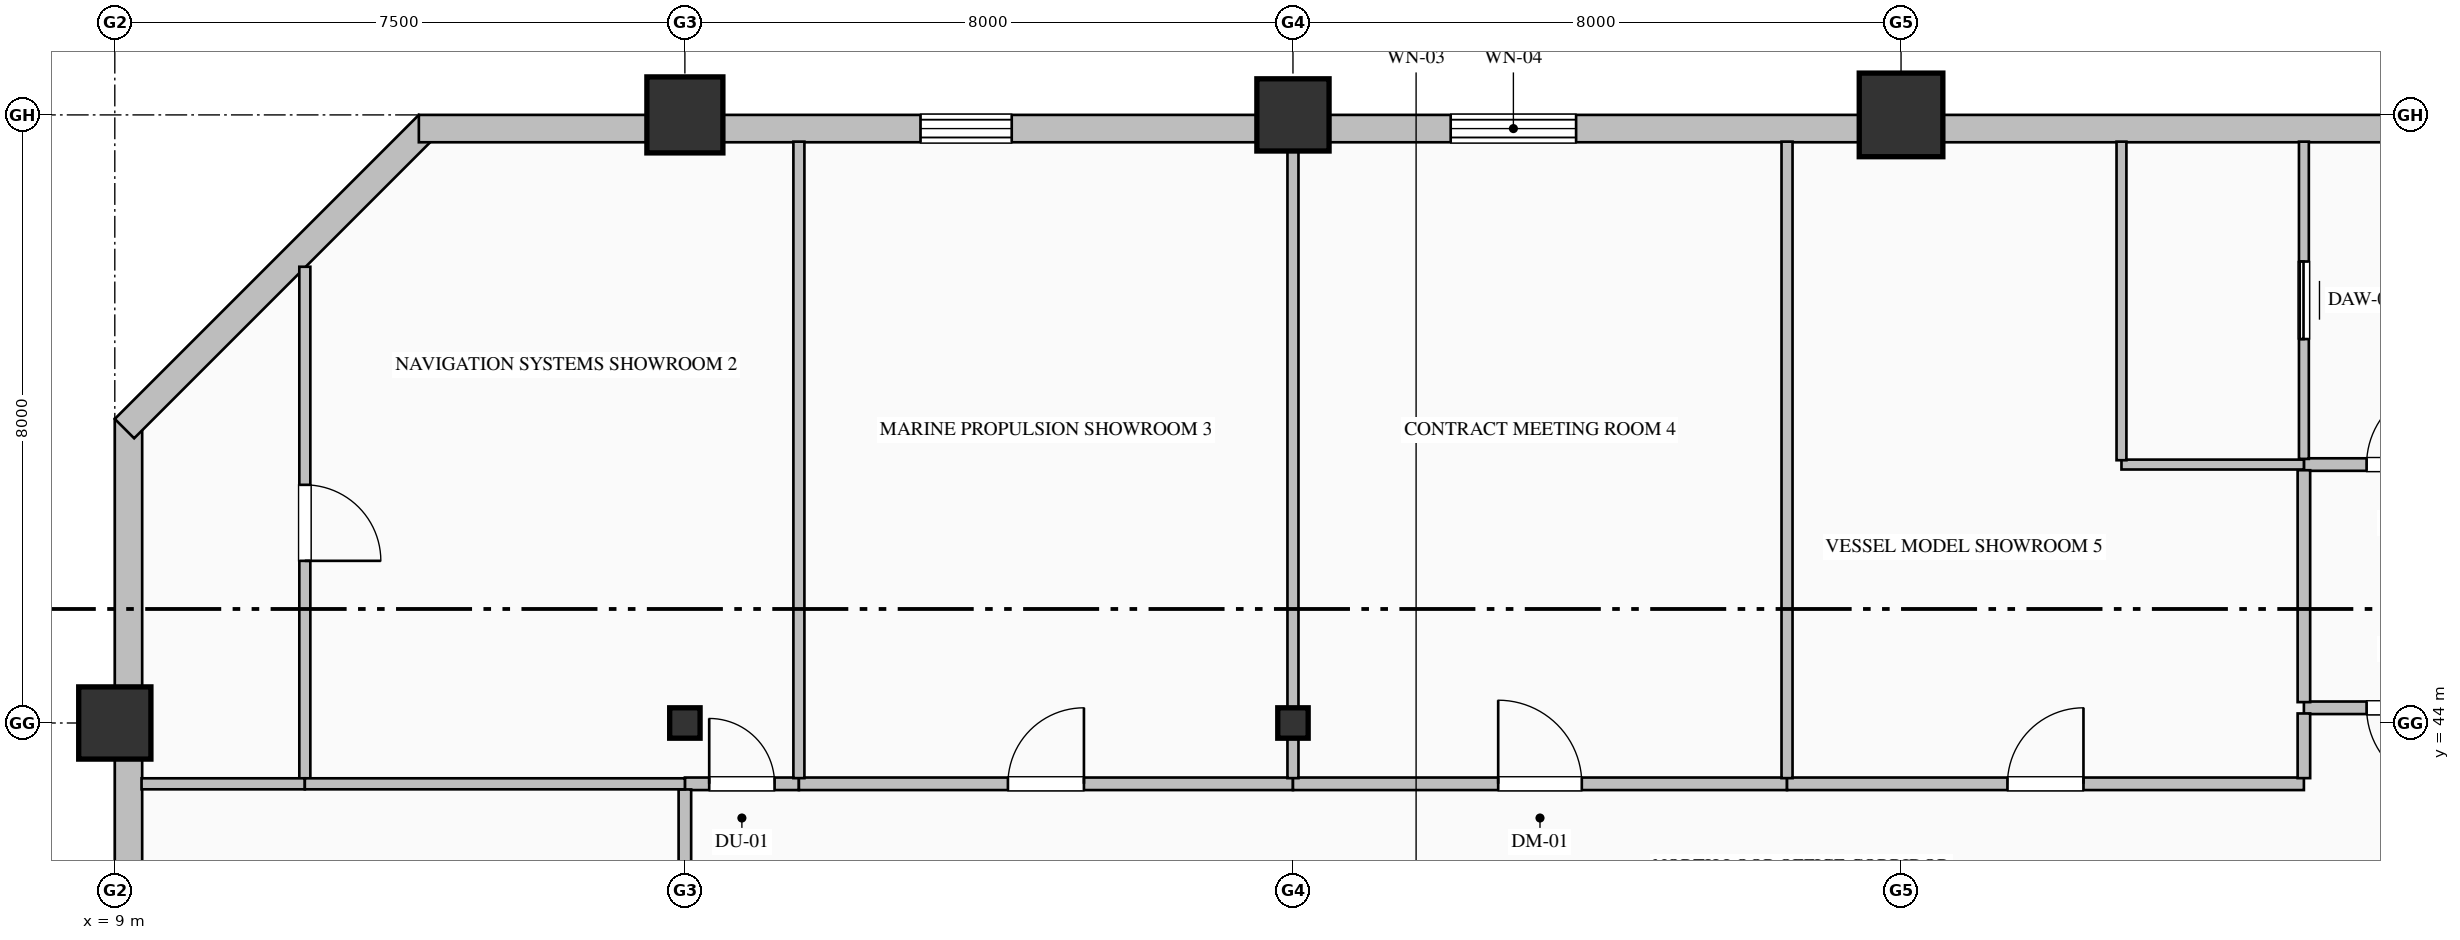
"""IFC4 building model, lengths in metres.
Left out: names, types, materials, properties, quantities, classifications, styles, units other than length and angle.
Written with IfcOpenShell. Run it as: python <this file> out.ifc"""

import sys

from ifc_helpers import new_model, si_unit, direction, frame, frame_2d, origin, origin_2d, place, context, subcontext, project, spatial, rectangle, hollow_rectangle, hollow_circle, i_section, extrude, element, fill, save


model = new_model("IFC4")
c1 = context("Model", 3, precision=1e-05, world=origin(), true_north=direction((0.0, 1.0)))
c2 = subcontext(c1, "Body", "Model", "MODEL_VIEW")
j1 = project(units=[si_unit("LENGTHUNIT", "METRE"), si_unit("PLANEANGLEUNIT", "RADIAN")], contexts=[c1])
p1 = place(None, origin())
s1 = spatial("IfcSite", under=j1, at=p1, CompositionType="ELEMENT")
p2 = place(p1, origin())
s2 = spatial("IfcBuilding", under=s1, at=p2, CompositionType="ELEMENT")
p3 = place(p2, frame((0.0, 0.0, 183.0)))
s3 = spatial("IfcBuildingStorey", under=s2, at=p3, CompositionType="ELEMENT", Elevation=183.0)
p4 = place(p3, frame((9.0, 44.0, 0.0), z_axis=(0.0, 0.0, 1.0), x_axis=(1.0, 0.0, 0.0)))
e1 = element("IfcColumn", 1, at=p4, inside=s3, PredefinedType="COLUMN", context=c2, shape_type="SweptSolid", body=[
    extrude(hollow_rectangle(XDim=0.95, YDim=0.95, WallThickness=0.036, at=origin_2d()), origin(), (0.0, 0.0, 1.0), 4.0),
])
p5 = place(p3, frame((16.5, 44.0, 0.0), z_axis=(0.0, 0.0, 1.0), x_axis=(1.0, 0.0, 0.0)))
e2 = element("IfcColumn", 2, at=p5, inside=s3, PredefinedType="COLUMN", context=c2, shape_type="SweptSolid", body=[
    extrude(i_section(OverallWidth=0.4, OverallDepth=0.4, WebThickness=0.013, FlangeThickness=0.021, FilletRadius=0.022, at=origin_2d()), origin(), (0.0, 0.0, 1.0), 4.0),
])
p6 = place(p3, frame((16.5, 52.0, 0.0), z_axis=(0.0, 0.0, 1.0), x_axis=(1.0, 0.0, 0.0)))
e3 = element("IfcColumn", 3, at=p6, inside=s3, PredefinedType="COLUMN", context=c2, shape_type="SweptSolid", body=[
    extrude(hollow_circle(Radius=0.5, WallThickness=0.036, at=origin_2d()), origin(), (0.0, 0.0, 1.0), 4.0),
])
p7 = place(p3, frame((24.5, 44.0, 0.0), z_axis=(0.0, 0.0, 1.0), x_axis=(1.0, 0.0, 0.0)))
e4 = element("IfcColumn", 4, at=p7, inside=s3, PredefinedType="COLUMN", context=c2, shape_type="SweptSolid", body=[
    extrude(i_section(OverallWidth=0.4, OverallDepth=0.4, WebThickness=0.013, FlangeThickness=0.021, FilletRadius=0.022, at=origin_2d()), origin(), (0.0, 0.0, 1.0), 4.0),
])
p8 = place(p3, frame((24.5, 52.0, 0.0), z_axis=(0.0, 0.0, 1.0), x_axis=(1.0, 0.0, 0.0)))
e5 = element("IfcColumn", 5, at=p8, inside=s3, PredefinedType="COLUMN", context=c2, shape_type="SweptSolid", body=[
    extrude(hollow_rectangle(XDim=0.95, YDim=0.95, WallThickness=0.036, at=origin_2d()), origin(), (0.0, 0.0, 1.0), 4.0),
])
p9 = place(p3, frame((32.5, 52.0, 0.0), z_axis=(0.0, 0.0, 1.0), x_axis=(1.0, 0.0, 0.0)))
e6 = element("IfcColumn", 6, at=p9, inside=s3, PredefinedType="COLUMN", context=c2, shape_type="SweptSolid", body=[
    extrude(hollow_rectangle(XDim=1.1, YDim=1.1, WallThickness=0.04, at=origin_2d()), origin(), (0.0, 0.0, 1.0), 4.0),
])
p10 = place(p3, frame((9.18, 32.0, 0.0), z_axis=(0.0, 0.0, 1.0), x_axis=(0.0, 1.0, 0.0)))
e7 = element("IfcWall", 7, at=p10, inside=s3, PredefinedType="SOLIDWALL", context=c2, shape_type="SweptSolid", body=[
    extrude(rectangle(XDim=16.0, YDim=0.36, at=frame_2d((8.0, 0.0))), origin(), (0.0, 0.0, 1.0), 3.265),
])
p11 = place(p10, frame((6.45, 0.0, 0.85)))
e8 = element("IfcOpeningElement", 8, at=p11, cuts=e7, PredefinedType="OPENING", context=c2, shape_type="SweptSolid", body=[
    extrude(rectangle(XDim=1.5, YDim=1.95, at=frame_2d((0.75, 0.975))), frame((0.0, 0.19, 0.0), z_axis=(0.0, -1.0, 0.0), x_axis=(1.0, 0.0, 0.0)), (0.0, 0.0, 1.0), 0.38),
])
p12 = place(p3, frame((9.127, 47.873, 0.0), z_axis=(0.0, 0.0, 1.0), x_axis=(0.707106781187, 0.707106781187, 0.0)))
e9 = element("IfcWall", 9, at=p12, inside=s3, PredefinedType="SOLIDWALL", context=c2, shape_type="SweptSolid", body=[
    extrude(rectangle(XDim=5.657, YDim=0.36, at=frame_2d((2.828, 0.0))), origin(), (0.0, 0.0, 1.0), 3.765),
])
p13 = place(p3, frame((13.0, 51.82, 0.0), z_axis=(0.0, 0.0, 1.0), x_axis=(1.0, 0.0, 0.0)))
e10 = element("IfcWall", 10, at=p13, inside=s3, PredefinedType="SOLIDWALL", context=c2, shape_type="SweptSolid", body=[
    extrude(rectangle(XDim=27.52, YDim=0.36, at=frame_2d((13.76, 0.0))), origin(), (0.0, 0.0, 1.0), 3.265),
])
p14 = place(p13, frame((6.6, 0.0, 0.7)))
e11 = element("IfcOpeningElement", 11, at=p14, cuts=e10, PredefinedType="OPENING", context=c2, shape_type="SweptSolid", body=[
    extrude(rectangle(XDim=1.2, YDim=1.85, at=frame_2d((0.6, 0.925))), frame((0.0, 0.19, 0.0), z_axis=(0.0, -1.0, 0.0), x_axis=(1.0, 0.0, 0.0)), (0.0, 0.0, 1.0), 0.38),
])
p15 = place(p13, frame((13.575, 0.0, 0.85)))
e12 = element("IfcOpeningElement", 12, at=p15, cuts=e10, PredefinedType="OPENING", context=c2, shape_type="SweptSolid", body=[
    extrude(rectangle(XDim=1.65, YDim=1.95, at=frame_2d((0.825, 0.975))), frame((0.0, 0.19, 0.0), z_axis=(0.0, -1.0, 0.0), x_axis=(1.0, 0.0, 0.0)), (0.0, 0.0, 1.0), 0.38),
])
p16 = place(p3, frame((37.8, 47.4, 0.0), z_axis=(0.0, 0.0, 1.0), x_axis=(1.0, 0.0, 0.0)))
e13 = element("IfcWall", 13, at=p16, inside=s3, PredefinedType="PARTITIONING", context=c2, shape_type="SweptSolid", body=[
    extrude(rectangle(XDim=2.7, YDim=0.165, at=frame_2d((1.35, 0.0))), origin(), (0.0, 0.0, 1.0), 3.765),
])
p17 = place(p16, frame((0.825, 0.0, 0.0)))
e14 = element("IfcOpeningElement", 14, at=p17, cuts=e13, PredefinedType="OPENING", context=c2, shape_type="SweptSolid", body=[
    extrude(rectangle(XDim=1.05, YDim=2.15, at=frame_2d((0.525, 1.075))), frame((0.0, 0.093, 0.0), z_axis=(0.0, -1.0, 0.0), x_axis=(1.0, 0.0, 0.0)), (0.0, 0.0, 1.0), 0.185),
])
p18 = place(p3, frame((40.5, 44.2, 0.0), z_axis=(0.0, 0.0, 1.0), x_axis=(-1.0, 0.0, 0.0)))
e15 = element("IfcWall", 15, at=p18, inside=s3, PredefinedType="PARTITIONING", context=c2, shape_type="SweptSolid", body=[
    extrude(rectangle(XDim=2.7, YDim=0.165, at=frame_2d((1.35, 0.0))), origin(), (0.0, 0.0, 1.0), 3.765),
])
p19 = place(p18, frame((0.825, 0.0, 0.0)))
e16 = element("IfcOpeningElement", 16, at=p19, cuts=e15, PredefinedType="OPENING", context=c2, shape_type="SweptSolid", body=[
    extrude(rectangle(XDim=1.05, YDim=2.15, at=frame_2d((0.525, 1.075))), frame((0.0, 0.093, 0.0), z_axis=(0.0, -1.0, 0.0), x_axis=(1.0, 0.0, 0.0)), (0.0, 0.0, 1.0), 0.185),
])
p20 = place(p3, frame((37.8, 44.274, 0.0), z_axis=(0.0, 0.0, 1.0), x_axis=(0.0, 1.0, 0.0)))
e17 = element("IfcWall", 17, at=p20, inside=s3, PredefinedType="PARTITIONING", context=c2, shape_type="SweptSolid", body=[
    extrude(rectangle(XDim=3.051, YDim=0.165, at=frame_2d((1.525, 0.0))), origin(), (0.0, 0.0, 1.0), 3.765),
])
p21 = place(p3, frame((37.8, 47.475, 0.0), z_axis=(0.0, 0.0, 1.0), x_axis=(0.0, 1.0, 0.0)))
e18 = element("IfcWall", 18, at=p21, inside=s3, PredefinedType="PARTITIONING", context=c2, shape_type="SweptSolid", body=[
    extrude(rectangle(XDim=4.173, YDim=0.13, at=frame_2d((2.087, 0.0))), origin(), (0.0, 0.0, 1.0), 3.765),
])
p22 = place(p21, frame((1.577, 0.0, 0.0)))
e19 = element("IfcOpeningElement", 19, at=p22, cuts=e18, PredefinedType="OPENING", context=c2, shape_type="SweptSolid", body=[
    extrude(rectangle(XDim=1.02, YDim=2.15, at=frame_2d((0.51, 1.075))), frame((0.0, 0.075, 0.0), z_axis=(0.0, -1.0, 0.0), x_axis=(1.0, 0.0, 0.0)), (0.0, 0.0, 1.0), 0.15),
])
p23 = place(p3, frame((37.8, 47.4, 0.0), z_axis=(0.0, 0.0, 1.0), x_axis=(-1.0, 0.0, 0.0)))
e20 = element("IfcWall", 20, at=p23, inside=s3, PredefinedType="PARTITIONING", context=c2, shape_type="SweptSolid", body=[
    extrude(rectangle(XDim=2.4, YDim=0.13, at=frame_2d((1.2, 0.0))), origin(), (0.0, 0.0, 1.0), 3.765),
])
p24 = place(p3, frame((35.4, 47.457, 0.0), z_axis=(0.0, 0.0, 1.0), x_axis=(0.0, 1.0, 0.0)))
e21 = element("IfcWall", 21, at=p24, inside=s3, PredefinedType="PARTITIONING", context=c2, shape_type="SweptSolid", body=[
    extrude(rectangle(XDim=4.191, YDim=0.13, at=frame_2d((2.095, 0.0))), origin(), (0.0, 0.0, 1.0), 3.765),
])
p25 = place(p3, frame((16.5, 43.2, 0.0), z_axis=(0.0, 0.0, 1.0), x_axis=(1.0, 0.0, 0.0)))
e22 = element("IfcWall", 22, at=p25, inside=s3, PredefinedType="PARTITIONING", context=c2, shape_type="SweptSolid", body=[
    extrude(rectangle(XDim=1.5, YDim=0.165, at=frame_2d((0.75, 0.0))), origin(), (0.0, 0.0, 1.0), 3.765),
])
p26 = place(p25, frame((0.32, 0.0, 0.0)))
e23 = element("IfcOpeningElement", 23, at=p26, cuts=e22, PredefinedType="OPENING", context=c2, shape_type="SweptSolid", body=[
    extrude(rectangle(XDim=0.86, YDim=2.1, at=frame_2d((0.43, 1.05))), frame((0.0, 0.093, 0.0), z_axis=(0.0, -1.0, 0.0), x_axis=(1.0, 0.0, 0.0)), (0.0, 0.0, 1.0), 0.185),
])
p27 = place(p3, frame((18.0, 43.2, 0.0), z_axis=(0.0, 0.0, 1.0), x_axis=(1.0, 0.0, 0.0)))
e24 = element("IfcWall", 24, at=p27, inside=s3, PredefinedType="PARTITIONING", context=c2, shape_type="SweptSolid", body=[
    extrude(rectangle(XDim=6.5, YDim=0.165, at=frame_2d((3.25, 0.0))), origin(), (0.0, 0.0, 1.0), 3.765),
])
p28 = place(p27, frame((2.75, 0.0, 0.0)))
e25 = element("IfcOpeningElement", 25, at=p28, cuts=e24, PredefinedType="OPENING", context=c2, shape_type="SweptSolid", body=[
    extrude(rectangle(XDim=1.0, YDim=2.15, at=frame_2d((0.5, 1.075))), frame((0.0, 0.093, 0.0), z_axis=(0.0, -1.0, 0.0), x_axis=(1.0, 0.0, 0.0)), (0.0, 0.0, 1.0), 0.185),
])
p29 = place(p3, frame((24.5, 43.2, 0.0), z_axis=(0.0, 0.0, 1.0), x_axis=(1.0, 0.0, 0.0)))
e26 = element("IfcWall", 26, at=p29, inside=s3, PredefinedType="PARTITIONING", context=c2, shape_type="SweptSolid", body=[
    extrude(rectangle(XDim=6.5, YDim=0.165, at=frame_2d((3.25, 0.0))), origin(), (0.0, 0.0, 1.0), 3.765),
])
p30 = place(p29, frame((2.7, 0.0, 0.0)))
e27 = element("IfcOpeningElement", 27, at=p30, cuts=e26, PredefinedType="OPENING", context=c2, shape_type="SweptSolid", body=[
    extrude(rectangle(XDim=1.1, YDim=2.2, at=frame_2d((0.55, 1.1))), frame((0.0, 0.093, 0.0), z_axis=(0.0, -1.0, 0.0), x_axis=(1.0, 0.0, 0.0)), (0.0, 0.0, 1.0), 0.185),
])
p31 = place(p3, frame((31.0, 43.2, 0.0), z_axis=(0.0, 0.0, 1.0), x_axis=(1.0, 0.0, 0.0)))
e28 = element("IfcWall", 28, at=p31, inside=s3, PredefinedType="PARTITIONING", context=c2, shape_type="SweptSolid", body=[
    extrude(rectangle(XDim=6.8, YDim=0.165, at=frame_2d((3.4, 0.0))), origin(), (0.0, 0.0, 1.0), 3.765),
])
p32 = place(p31, frame((2.9, 0.0, 0.0)))
e29 = element("IfcOpeningElement", 29, at=p32, cuts=e28, PredefinedType="OPENING", context=c2, shape_type="SweptSolid", body=[
    extrude(rectangle(XDim=1.0, YDim=2.15, at=frame_2d((0.5, 1.075))), frame((0.0, 0.093, 0.0), z_axis=(0.0, -1.0, 0.0), x_axis=(1.0, 0.0, 0.0)), (0.0, 0.0, 1.0), 0.185),
])
p33 = place(p3, frame((16.5, 41.0, 0.0), z_axis=(0.0, 0.0, 1.0), x_axis=(0.0, 1.0, 0.0)))
e30 = element("IfcWall", 30, at=p33, inside=s3, PredefinedType="PARTITIONING", context=c2, shape_type="SweptSolid", body=[
    extrude(rectangle(XDim=2.125, YDim=0.165, at=frame_2d((1.063, 0.0))), origin(), (0.0, 0.0, 1.0), 3.157),
])
p34 = place(p3, frame((37.8, 43.274, 0.0), z_axis=(0.0, 0.0, 1.0), x_axis=(0.0, 1.0, 0.0)))
e31 = element("IfcWall", 31, at=p34, inside=s3, PredefinedType="PARTITIONING", context=c2, shape_type="SweptSolid", body=[
    extrude(rectangle(XDim=0.851, YDim=0.165, at=frame_2d((0.426, 0.0))), origin(), (0.0, 0.0, 1.0), 3.765),
])
p35 = place(p3, frame((11.5, 50.002, 0.0), z_axis=(0.0, 0.0, 1.0), x_axis=(0.0, -1.0, 0.0)))
e32 = element("IfcWall", 32, at=p35, inside=s3, PredefinedType="PARTITIONING", context=c2, shape_type="SweptSolid", body=[
    extrude(rectangle(XDim=6.738, YDim=0.145, at=frame_2d((3.369, 0.0))), origin(), (0.0, 0.0, 1.0), 3.765),
])
p36 = place(p35, frame((2.869, 0.0, 0.0)))
e33 = element("IfcOpeningElement", 33, at=p36, cuts=e32, PredefinedType="OPENING", context=c2, shape_type="SweptSolid", body=[
    extrude(rectangle(XDim=1.0, YDim=2.15, at=frame_2d((0.5, 1.075))), frame((0.0, 0.083, 0.0), z_axis=(0.0, -1.0, 0.0), x_axis=(1.0, 0.0, 0.0)), (0.0, 0.0, 1.0), 0.165),
])
p37 = place(p3, frame((11.5, 43.2, 0.0), z_axis=(0.0, 0.0, 1.0), x_axis=(-1.0, 0.0, 0.0)))
e34 = element("IfcWall", 34, at=p37, inside=s3, PredefinedType="PARTITIONING", context=c2, shape_type="SweptSolid", body=[
    extrude(rectangle(XDim=2.148, YDim=0.145, at=frame_2d((1.074, 0.0))), origin(), (0.0, 0.0, 1.0), 3.765),
])
p38 = place(p3, frame((18.0, 51.648, 0.0), z_axis=(0.0, 0.0, 1.0), x_axis=(0.0, -1.0, 0.0)))
e35 = element("IfcWall", 35, at=p38, inside=s3, PredefinedType="PARTITIONING", context=c2, shape_type="SweptSolid", body=[
    extrude(rectangle(XDim=8.374, YDim=0.145, at=frame_2d((4.187, 0.0))), origin(), (0.0, 0.0, 1.0), 3.765),
])
p39 = place(p3, frame((16.5, 43.2, 0.0), z_axis=(0.0, 0.0, 1.0), x_axis=(-1.0, 0.0, 0.0)))
e36 = element("IfcWall", 36, at=p39, inside=s3, PredefinedType="PARTITIONING", context=c2, shape_type="SweptSolid", body=[
    extrude(rectangle(XDim=5.0, YDim=0.145, at=frame_2d((2.5, 0.0))), origin(), (0.0, 0.0, 1.0), 3.765),
])
p40 = place(p3, frame((24.5, 51.648, 0.0), z_axis=(0.0, 0.0, 1.0), x_axis=(0.0, -1.0, 0.0)))
e37 = element("IfcWall", 37, at=p40, inside=s3, PredefinedType="PARTITIONING", context=c2, shape_type="SweptSolid", body=[
    extrude(rectangle(XDim=8.374, YDim=0.145, at=frame_2d((4.187, 0.0))), origin(), (0.0, 0.0, 1.0), 3.157),
])
p41 = place(p3, frame((31.0, 51.648, 0.0), z_axis=(0.0, 0.0, 1.0), x_axis=(0.0, -1.0, 0.0)))
e38 = element("IfcWall", 38, at=p41, inside=s3, PredefinedType="PARTITIONING", context=c2, shape_type="SweptSolid", body=[
    extrude(rectangle(XDim=8.374, YDim=0.145, at=frame_2d((4.187, 0.0))), origin(), (0.0, 0.0, 1.0), 3.765),
])
p42 = place(p14, origin())
e39 = element("IfcWindow", 39, at=p42, inside=s3, PartitioningType="DOUBLE_PANEL_VERTICAL", PredefinedType="WINDOW", context=c2, shape_type="SweptSolid", body=[
    extrude(rectangle(XDim=1.2, YDim=1.85, at=frame_2d((0.6, 0.925))), frame((0.0, 0.15, 0.0), z_axis=(0.0, -1.0, 0.0), x_axis=(1.0, 0.0, 0.0)), (0.0, 0.0, 1.0), 0.06),
])
fill(e11, e39)
p43 = place(p15, origin())
e40 = element("IfcWindow", 40, at=p43, inside=s3, PartitioningType="DOUBLE_PANEL_VERTICAL", PredefinedType="WINDOW", context=c2, shape_type="SweptSolid", body=[
    extrude(rectangle(XDim=1.65, YDim=1.95, at=frame_2d((0.825, 0.975))), frame((0.0, 0.15, 0.0), z_axis=(0.0, -1.0, 0.0), x_axis=(1.0, 0.0, 0.0)), (0.0, 0.0, 1.0), 0.06),
])
fill(e12, e40)
p44 = place(p17, origin())
e41 = element("IfcDoor", 41, at=p44, inside=s3, OperationType="SINGLE_SWING_RIGHT", PredefinedType="DOOR", context=c2, shape_type="SweptSolid", body=[
    extrude(rectangle(XDim=1.05, YDim=2.15, at=frame_2d((0.525, 1.075))), frame((0.0, 0.025, 0.0), z_axis=(0.0, -1.0, 0.0), x_axis=(1.0, 0.0, 0.0)), (0.0, 0.0, 1.0), 0.05),
])
fill(e14, e41)
p45 = place(p19, origin())
e42 = element("IfcDoor", 42, at=p45, inside=s3, OperationType="SINGLE_SWING_LEFT", PredefinedType="DOOR", context=c2, shape_type="SweptSolid", body=[
    extrude(rectangle(XDim=1.05, YDim=2.15, at=frame_2d((0.525, 1.075))), frame((0.0, 0.025, 0.0), z_axis=(0.0, -1.0, 0.0), x_axis=(1.0, 0.0, 0.0)), (0.0, 0.0, 1.0), 0.05),
])
fill(e16, e42)
p46 = place(p22, origin())
e43 = element("IfcDoor", 43, at=p46, inside=s3, OperationType="SLIDING_TO_LEFT", PredefinedType="DOOR", context=c2, shape_type="SweptSolid", body=[
    extrude(rectangle(XDim=1.02, YDim=2.15, at=frame_2d((0.51, 1.075))), frame((0.0, 0.025, 0.0), z_axis=(0.0, -1.0, 0.0), x_axis=(1.0, 0.0, 0.0)), (0.0, 0.0, 1.0), 0.05),
])
fill(e19, e43)
p47 = place(p36, origin())
e44 = element("IfcDoor", 44, at=p47, inside=s3, OperationType="SINGLE_SWING_RIGHT", PredefinedType="DOOR", context=c2, shape_type="SweptSolid", body=[
    extrude(rectangle(XDim=1.0, YDim=2.15, at=frame_2d((0.5, 1.075))), frame((0.0, 0.025, 0.0), z_axis=(0.0, -1.0, 0.0), x_axis=(1.0, 0.0, 0.0)), (0.0, 0.0, 1.0), 0.05),
])
fill(e33, e44)
p48 = place(p26, origin())
e45 = element("IfcDoor", 45, at=p48, inside=s3, OperationType="SINGLE_SWING_LEFT", PredefinedType="DOOR", context=c2, shape_type="SweptSolid", body=[
    extrude(rectangle(XDim=0.86, YDim=2.1, at=frame_2d((0.43, 1.05))), frame((0.0, 0.025, 0.0), z_axis=(0.0, -1.0, 0.0), x_axis=(1.0, 0.0, 0.0)), (0.0, 0.0, 1.0), 0.05),
])
fill(e23, e45)
p49 = place(p28, origin())
e46 = element("IfcDoor", 46, at=p49, inside=s3, OperationType="SINGLE_SWING_RIGHT", PredefinedType="DOOR", context=c2, shape_type="SweptSolid", body=[
    extrude(rectangle(XDim=1.0, YDim=2.15, at=frame_2d((0.5, 1.075))), frame((0.0, 0.025, 0.0), z_axis=(0.0, -1.0, 0.0), x_axis=(1.0, 0.0, 0.0)), (0.0, 0.0, 1.0), 0.05),
])
fill(e25, e46)
p50 = place(p30, origin())
e47 = element("IfcDoor", 47, at=p50, inside=s3, OperationType="SINGLE_SWING_LEFT", PredefinedType="DOOR", context=c2, shape_type="SweptSolid", body=[
    extrude(rectangle(XDim=1.1, YDim=2.2, at=frame_2d((0.55, 1.1))), frame((0.0, 0.025, 0.0), z_axis=(0.0, -1.0, 0.0), x_axis=(1.0, 0.0, 0.0)), (0.0, 0.0, 1.0), 0.05),
])
fill(e27, e47)
p51 = place(p32, origin())
e48 = element("IfcDoor", 48, at=p51, inside=s3, OperationType="SINGLE_SWING_RIGHT", PredefinedType="DOOR", context=c2, shape_type="SweptSolid", body=[
    extrude(rectangle(XDim=1.0, YDim=2.15, at=frame_2d((0.5, 1.075))), frame((0.0, 0.025, 0.0), z_axis=(0.0, -1.0, 0.0), x_axis=(1.0, 0.0, 0.0)), (0.0, 0.0, 1.0), 0.05),
])
fill(e29, e48)
save(model, sys.argv[1])
